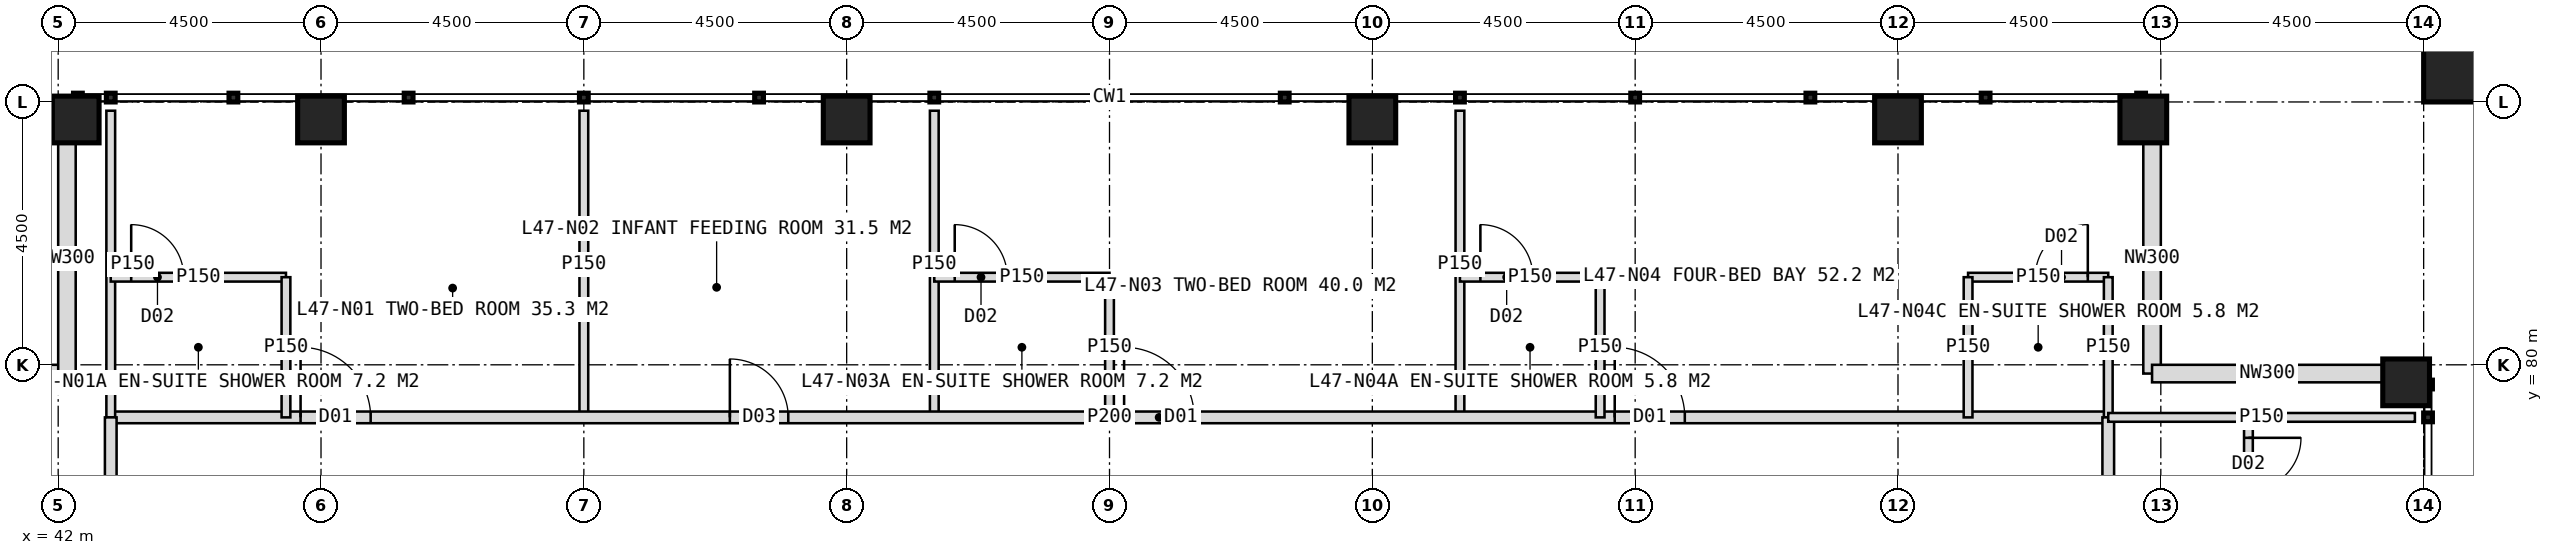
"""IFC4 building model, lengths in metres.
Left out: names, types, materials, properties, quantities, classifications, styles, units other than length and angle.
Written with IfcOpenShell. Run it as: python <this file> out.ifc"""

import sys

from ifc_helpers import new_model, si_unit, direction, frame, frame_2d, origin, origin_2d, place, context, subcontext, project, spatial, rectangle, hollow_rectangle, extrude, element, fill, save


model = new_model("IFC4")
c1 = context("Model", 3, precision=1e-05, world=origin(), true_north=direction((0.0, 1.0)))
c2 = subcontext(c1, "Body", "Model", "MODEL_VIEW")
j1 = project(units=[si_unit("LENGTHUNIT", "METRE"), si_unit("PLANEANGLEUNIT", "RADIAN")], contexts=[c1])
p1 = place(None, origin())
s1 = spatial("IfcSite", under=j1, at=p1, CompositionType="ELEMENT")
p2 = place(p1, origin())
s2 = spatial("IfcBuilding", under=s1, at=p2, CompositionType="ELEMENT")
p3 = place(p2, frame((0.0, 0.0, 197.0)))
s3 = spatial("IfcBuildingStorey", under=s2, at=p3, CompositionType="ELEMENT", Elevation=197.0)
for number, where, z_axis, x_axis in (
    (1, (42.3, 84.2, 0.0), (0.0, 0.0, 1.0), (1.0, 0.0, 0.0)),
    (2, (46.5, 84.2, 0.0), (0.0, 0.0, 1.0), (1.0, 0.0, 0.0)),
    (3, (55.5, 84.2, 0.0), (0.0, 0.0, 1.0), (1.0, 0.0, 0.0)),
    (4, (64.5, 84.2, 0.0), (0.0, 0.0, 1.0), (1.0, 0.0, 0.0)),
    (5, (73.5, 84.2, 0.0), (0.0, 0.0, 1.0), (1.0, 0.0, 0.0)),
    (6, (77.7, 84.2, 0.0), (0.0, 0.0, 1.0), (1.0, 0.0, 0.0)),
    (7, (82.2, 79.7, 0.0), (0.0, 0.0, 1.0), (1.0, 0.0, 0.0)),
):
    element("IfcColumn", number, at=place(p3, frame(where, z_axis=z_axis, x_axis=x_axis)), inside=s3, PredefinedType="COLUMN", context=c2, shape_type="SweptSolid", body=[
        extrude(hollow_rectangle(XDim=0.8, YDim=0.8, WallThickness=0.08, at=origin_2d()), origin(), (0.0, 0.0, 1.0), 4.0),
    ])
p4 = place(p3, frame((83.1, 85.1, 0.0), z_axis=(0.0, 0.0, 1.0), x_axis=(1.0, 0.0, 0.0)))
e8 = element("IfcColumn", 8, at=p4, inside=s3, PredefinedType="COLUMN", context=c2, shape_type="SweptSolid", body=[
    extrude(hollow_rectangle(XDim=1.2, YDim=1.2, WallThickness=0.07, at=origin_2d()), origin(), (0.0, 0.0, 1.0), 4.0),
])
for number, where, z_axis, x_axis in (
    (9, (77.85, 83.8, 0.0), (0.0, 0.0, 1.0), (0.0, -1.0, 0.0)),
    (10, (77.85, 79.85, 0.0), (0.0, 0.0, 1.0), (1.0, 0.0, 0.0)),
    (11, (38.2, 79.85, 0.0), (0.0, 0.0, 1.0), (1.0, 0.0, 0.0)),
    (12, (42.15, 79.85, 0.0), (0.0, 0.0, 1.0), (0.0, 1.0, 0.0)),
):
    element("IfcWall", number, at=place(p3, frame(where, z_axis=z_axis, x_axis=x_axis)), inside=s3, PredefinedType="ELEMENTEDWALL", context=c2, shape_type="SweptSolid", body=[
        extrude(rectangle(XDim=3.95, YDim=0.3, at=frame_2d((1.975, 0.0))), origin(), (0.0, 0.0, 1.0), 2.85),
    ])
for number, where, z_axis, x_axis in (
    (13, (51.0, 79.1, 0.0), (0.0, 0.0, 1.0), (0.0, 1.0, 0.0)),
    (14, (57.0, 79.1, 0.0), (0.0, 0.0, 1.0), (0.0, 1.0, 0.0)),
    (15, (66.0, 79.1, 0.0), (0.0, 0.0, 1.0), (0.0, 1.0, 0.0)),
):
    element("IfcWall", number, at=place(p3, frame(where, z_axis=z_axis, x_axis=x_axis)), inside=s3, PredefinedType="PARTITIONING", context=c2, shape_type="SweptSolid", body=[
        extrude(rectangle(XDim=5.25, YDim=0.15, at=frame_2d((2.625, 0.0))), origin(), (0.0, 0.0, 1.0), 3.75),
    ])
p5 = place(p3, frame((42.9, 79.1, 0.0), z_axis=(0.0, 0.0, 1.0), x_axis=(1.0, 0.0, 0.0)))
e16 = element("IfcWall", 16, at=p5, inside=s3, PredefinedType="PARTITIONING", context=c2, shape_type="SweptSolid", body=[
    extrude(rectangle(XDim=34.2, YDim=0.2, at=frame_2d((17.1, 0.0))), origin(), (0.0, 0.0, 1.0), 3.75),
])
p6 = place(p5, frame((3.25, 0.0, 0.0)))
e17 = element("IfcOpeningElement", 17, at=p6, cuts=e16, PredefinedType="OPENING", context=c2, shape_type="SweptSolid", body=[
    extrude(rectangle(XDim=1.2, YDim=2.2, at=frame_2d((0.6, 1.1))), frame((0.0, 0.11, 0.0), z_axis=(0.0, -1.0, 0.0), x_axis=(1.0, 0.0, 0.0)), (0.0, 0.0, 1.0), 0.22),
])
p7 = place(p5, frame((10.6, 0.0, 0.0)))
e18 = element("IfcOpeningElement", 18, at=p7, cuts=e16, PredefinedType="OPENING", context=c2, shape_type="SweptSolid", body=[
    extrude(rectangle(XDim=1.0, YDim=2.1, at=frame_2d((0.5, 1.05))), frame((0.0, 0.11, 0.0), z_axis=(0.0, -1.0, 0.0), x_axis=(1.0, 0.0, 0.0)), (0.0, 0.0, 1.0), 0.22),
])
p8 = place(p5, frame((17.35, 0.0, 0.0)))
e19 = element("IfcOpeningElement", 19, at=p8, cuts=e16, PredefinedType="OPENING", context=c2, shape_type="SweptSolid", body=[
    extrude(rectangle(XDim=1.2, YDim=2.2, at=frame_2d((0.6, 1.1))), frame((0.0, 0.11, 0.0), z_axis=(0.0, -1.0, 0.0), x_axis=(1.0, 0.0, 0.0)), (0.0, 0.0, 1.0), 0.22),
])
p9 = place(p5, frame((25.75, 0.0, 0.0)))
e20 = element("IfcOpeningElement", 20, at=p9, cuts=e16, PredefinedType="OPENING", context=c2, shape_type="SweptSolid", body=[
    extrude(rectangle(XDim=1.2, YDim=2.2, at=frame_2d((0.6, 1.1))), frame((0.0, 0.11, 0.0), z_axis=(0.0, -1.0, 0.0), x_axis=(1.0, 0.0, 0.0)), (0.0, 0.0, 1.0), 0.22),
])
p10 = place(p3, frame((42.9, 79.1, 0.0), z_axis=(0.0, 0.0, 1.0), x_axis=(0.0, 1.0, 0.0)))
e21 = element("IfcWall", 21, at=p10, inside=s3, PredefinedType="PARTITIONING", context=c2, shape_type="SweptSolid", body=[
    extrude(rectangle(XDim=5.25, YDim=0.15, at=frame_2d((2.625, 0.0))), origin(), (0.0, 0.0, 1.0), 3.75),
])
p11 = place(p3, frame((42.9, 81.5, 0.0), z_axis=(0.0, 0.0, 1.0), x_axis=(1.0, 0.0, 0.0)))
e22 = element("IfcWall", 22, at=p11, inside=s3, PredefinedType="PARTITIONING", context=c2, shape_type="SweptSolid", body=[
    extrude(rectangle(XDim=3.0, YDim=0.15, at=frame_2d((1.5, 0.0))), origin(), (0.0, 0.0, 1.0), 3.75),
])
p12 = place(p11, frame((0.35, 0.0, 0.0)))
e23 = element("IfcOpeningElement", 23, at=p12, cuts=e22, PredefinedType="OPENING", context=c2, shape_type="SweptSolid", body=[
    extrude(rectangle(XDim=0.9, YDim=2.1, at=frame_2d((0.45, 1.05))), frame((0.0, 0.085, 0.0), z_axis=(0.0, -1.0, 0.0), x_axis=(1.0, 0.0, 0.0)), (0.0, 0.0, 1.0), 0.17),
])
p13 = place(p3, frame((45.9, 79.1, 0.0), z_axis=(0.0, 0.0, 1.0), x_axis=(0.0, 1.0, 0.0)))
e24 = element("IfcWall", 24, at=p13, inside=s3, PredefinedType="PARTITIONING", context=c2, shape_type="SweptSolid", body=[
    extrude(rectangle(XDim=2.4, YDim=0.15, at=frame_2d((1.2, 0.0))), origin(), (0.0, 0.0, 1.0), 3.75),
])
p14 = place(p3, frame((57.0, 81.5, 0.0), z_axis=(0.0, 0.0, 1.0), x_axis=(1.0, 0.0, 0.0)))
e25 = element("IfcWall", 25, at=p14, inside=s3, PredefinedType="PARTITIONING", context=c2, shape_type="SweptSolid", body=[
    extrude(rectangle(XDim=3.0, YDim=0.15, at=frame_2d((1.5, 0.0))), origin(), (0.0, 0.0, 1.0), 3.75),
])
p15 = place(p14, frame((0.35, 0.0, 0.0)))
e26 = element("IfcOpeningElement", 26, at=p15, cuts=e25, PredefinedType="OPENING", context=c2, shape_type="SweptSolid", body=[
    extrude(rectangle(XDim=0.9, YDim=2.1, at=frame_2d((0.45, 1.05))), frame((0.0, 0.085, 0.0), z_axis=(0.0, -1.0, 0.0), x_axis=(1.0, 0.0, 0.0)), (0.0, 0.0, 1.0), 0.17),
])
p16 = place(p3, frame((60.0, 79.1, 0.0), z_axis=(0.0, 0.0, 1.0), x_axis=(0.0, 1.0, 0.0)))
e27 = element("IfcWall", 27, at=p16, inside=s3, PredefinedType="PARTITIONING", context=c2, shape_type="SweptSolid", body=[
    extrude(rectangle(XDim=2.4, YDim=0.15, at=frame_2d((1.2, 0.0))), origin(), (0.0, 0.0, 1.0), 2.95),
])
p17 = place(p3, frame((66.0, 81.5, 0.0), z_axis=(0.0, 0.0, 1.0), x_axis=(1.0, 0.0, 0.0)))
e28 = element("IfcWall", 28, at=p17, inside=s3, PredefinedType="PARTITIONING", context=c2, shape_type="SweptSolid", body=[
    extrude(rectangle(XDim=2.4, YDim=0.15, at=frame_2d((1.2, 0.0))), origin(), (0.0, 0.0, 1.0), 3.75),
])
p18 = place(p17, frame((0.35, 0.0, 0.0)))
e29 = element("IfcOpeningElement", 29, at=p18, cuts=e28, PredefinedType="OPENING", context=c2, shape_type="SweptSolid", body=[
    extrude(rectangle(XDim=0.9, YDim=2.1, at=frame_2d((0.45, 1.05))), frame((0.0, 0.085, 0.0), z_axis=(0.0, -1.0, 0.0), x_axis=(1.0, 0.0, 0.0)), (0.0, 0.0, 1.0), 0.17),
])
p19 = place(p3, frame((68.4, 79.1, 0.0), z_axis=(0.0, 0.0, 1.0), x_axis=(0.0, 1.0, 0.0)))
e30 = element("IfcWall", 30, at=p19, inside=s3, PredefinedType="PARTITIONING", context=c2, shape_type="SweptSolid", body=[
    extrude(rectangle(XDim=2.4, YDim=0.15, at=frame_2d((1.2, 0.0))), origin(), (0.0, 0.0, 1.0), 3.75),
])
p20 = place(p3, frame((74.7, 81.5, 0.0), z_axis=(0.0, 0.0, 1.0), x_axis=(1.0, 0.0, 0.0)))
e31 = element("IfcWall", 31, at=p20, inside=s3, PredefinedType="PARTITIONING", context=c2, shape_type="SweptSolid", body=[
    extrude(rectangle(XDim=2.4, YDim=0.15, at=frame_2d((1.2, 0.0))), origin(), (0.0, 0.0, 1.0), 3.75),
])
p21 = place(p20, frame((1.15, 0.0, 0.0)))
e32 = element("IfcOpeningElement", 32, at=p21, cuts=e31, PredefinedType="OPENING", context=c2, shape_type="SweptSolid", body=[
    extrude(rectangle(XDim=0.9, YDim=2.1, at=frame_2d((0.45, 1.05))), frame((0.0, 0.085, 0.0), z_axis=(0.0, -1.0, 0.0), x_axis=(1.0, 0.0, 0.0)), (0.0, 0.0, 1.0), 0.17),
])
for number, where, z_axis, x_axis in (
    (33, (74.7, 79.1, 0.0), (0.0, 0.0, 1.0), (0.0, 1.0, 0.0)),
    (34, (77.1, 79.1, 0.0), (0.0, 0.0, 1.0), (0.0, 1.0, 0.0)),
):
    element("IfcWall", number, at=place(p3, frame(where, z_axis=z_axis, x_axis=x_axis)), inside=s3, PredefinedType="PARTITIONING", context=c2, shape_type="SweptSolid", body=[
        extrude(rectangle(XDim=2.4, YDim=0.15, at=frame_2d((1.2, 0.0))), origin(), (0.0, 0.0, 1.0), 3.75),
    ])
p22 = place(p3, frame((42.9, 44.9, 0.0), z_axis=(0.0, 0.0, 1.0), x_axis=(0.0, 1.0, 0.0)))
e35 = element("IfcWall", 35, at=p22, inside=s3, PredefinedType="PARTITIONING", context=c2, shape_type="SweptSolid", body=[
    extrude(rectangle(XDim=34.2, YDim=0.2, at=frame_2d((17.1, 0.0))), origin(), (0.0, 0.0, 1.0), 3.75),
])
p23 = place(p22, frame((3.25, 0.0, 0.0)))
e36 = element("IfcOpeningElement", 36, at=p23, cuts=e35, PredefinedType="OPENING", context=c2, shape_type="SweptSolid", body=[
    extrude(rectangle(XDim=1.2, YDim=2.2, at=frame_2d((0.6, 1.1))), frame((0.0, 0.11, 0.0), z_axis=(0.0, -1.0, 0.0), x_axis=(1.0, 0.0, 0.0)), (0.0, 0.0, 1.0), 0.22),
])
p24 = place(p22, frame((11.35, 0.0, 0.0)))
e37 = element("IfcOpeningElement", 37, at=p24, cuts=e35, PredefinedType="OPENING", context=c2, shape_type="SweptSolid", body=[
    extrude(rectangle(XDim=1.2, YDim=2.2, at=frame_2d((0.6, 1.1))), frame((0.0, 0.11, 0.0), z_axis=(0.0, -1.0, 0.0), x_axis=(1.0, 0.0, 0.0)), (0.0, 0.0, 1.0), 0.22),
])
p25 = place(p22, frame((20.35, 0.0, 0.0)))
e38 = element("IfcOpeningElement", 38, at=p25, cuts=e35, PredefinedType="OPENING", context=c2, shape_type="SweptSolid", body=[
    extrude(rectangle(XDim=1.2, YDim=2.2, at=frame_2d((0.6, 1.1))), frame((0.0, 0.11, 0.0), z_axis=(0.0, -1.0, 0.0), x_axis=(1.0, 0.0, 0.0)), (0.0, 0.0, 1.0), 0.22),
])
p26 = place(p22, frame((29.35, 0.0, 0.0)))
e39 = element("IfcOpeningElement", 39, at=p26, cuts=e35, PredefinedType="OPENING", context=c2, shape_type="SweptSolid", body=[
    extrude(rectangle(XDim=1.2, YDim=2.2, at=frame_2d((0.6, 1.1))), frame((0.0, 0.11, 0.0), z_axis=(0.0, -1.0, 0.0), x_axis=(1.0, 0.0, 0.0)), (0.0, 0.0, 1.0), 0.22),
])
p27 = place(p3, frame((77.1, 79.1, 0.0), z_axis=(0.0, 0.0, 1.0), x_axis=(0.0, -1.0, 0.0)))
e40 = element("IfcWall", 40, at=p27, inside=s3, PredefinedType="PARTITIONING", context=c2, shape_type="SweptSolid", body=[
    extrude(rectangle(XDim=34.2, YDim=0.2, at=frame_2d((17.1, 0.0))), origin(), (0.0, 0.0, 1.0), 3.75),
])
p28 = place(p27, frame((3.25, 0.0, 0.0)))
e41 = element("IfcOpeningElement", 41, at=p28, cuts=e40, PredefinedType="OPENING", context=c2, shape_type="SweptSolid", body=[
    extrude(rectangle(XDim=1.2, YDim=2.2, at=frame_2d((0.6, 1.1))), frame((0.0, 0.11, 0.0), z_axis=(0.0, -1.0, 0.0), x_axis=(1.0, 0.0, 0.0)), (0.0, 0.0, 1.0), 0.22),
])
p29 = place(p27, frame((11.35, 0.0, 0.0)))
e42 = element("IfcOpeningElement", 42, at=p29, cuts=e40, PredefinedType="OPENING", context=c2, shape_type="SweptSolid", body=[
    extrude(rectangle(XDim=1.2, YDim=2.2, at=frame_2d((0.6, 1.1))), frame((0.0, 0.11, 0.0), z_axis=(0.0, -1.0, 0.0), x_axis=(1.0, 0.0, 0.0)), (0.0, 0.0, 1.0), 0.22),
])
p30 = place(p27, frame((19.75, 0.0, 0.0)))
e43 = element("IfcOpeningElement", 43, at=p30, cuts=e40, PredefinedType="OPENING", context=c2, shape_type="SweptSolid", body=[
    extrude(rectangle(XDim=1.2, YDim=2.2, at=frame_2d((0.6, 1.1))), frame((0.0, 0.11, 0.0), z_axis=(0.0, -1.0, 0.0), x_axis=(1.0, 0.0, 0.0)), (0.0, 0.0, 1.0), 0.22),
])
p31 = place(p27, frame((25.75, 0.0, 0.0)))
e44 = element("IfcOpeningElement", 44, at=p31, cuts=e40, PredefinedType="OPENING", context=c2, shape_type="SweptSolid", body=[
    extrude(rectangle(XDim=1.2, YDim=2.2, at=frame_2d((0.6, 1.1))), frame((0.0, 0.11, 0.0), z_axis=(0.0, -1.0, 0.0), x_axis=(1.0, 0.0, 0.0)), (0.0, 0.0, 1.0), 0.22),
])
p32 = place(p3, frame((77.1, 79.1, 0.0), z_axis=(0.0, 0.0, 1.0), x_axis=(1.0, 0.0, 0.0)))
e45 = element("IfcWall", 45, at=p32, inside=s3, PredefinedType="PARTITIONING", context=c2, shape_type="SweptSolid", body=[
    extrude(rectangle(XDim=5.25, YDim=0.15, at=frame_2d((2.625, 0.0))), origin(), (0.0, 0.0, 1.0), 3.75),
])
p33 = place(p3, frame((79.5, 79.1, 0.0), z_axis=(0.0, 0.0, 1.0), x_axis=(0.0, -1.0, 0.0)))
e46 = element("IfcWall", 46, at=p33, inside=s3, PredefinedType="PARTITIONING", context=c2, shape_type="SweptSolid", body=[
    extrude(rectangle(XDim=3.0, YDim=0.15, at=frame_2d((1.5, 0.0))), origin(), (0.0, 0.0, 1.0), 3.75),
])
p34 = place(p33, frame((0.35, 0.0, 0.0)))
e47 = element("IfcOpeningElement", 47, at=p34, cuts=e46, PredefinedType="OPENING", context=c2, shape_type="SweptSolid", body=[
    extrude(rectangle(XDim=0.9, YDim=2.1, at=frame_2d((0.45, 1.05))), frame((0.0, 0.085, 0.0), z_axis=(0.0, -1.0, 0.0), x_axis=(1.0, 0.0, 0.0)), (0.0, 0.0, 1.0), 0.17),
])
p35 = place(p6, origin())
e48 = element("IfcDoor", 48, at=p35, inside=s3, OperationType="SINGLE_SWING_LEFT", PredefinedType="DOOR", context=c2, shape_type="SweptSolid", body=[
    extrude(rectangle(XDim=1.2, YDim=2.2, at=frame_2d((0.6, 1.1))), frame((0.0, 0.025, 0.0), z_axis=(0.0, -1.0, 0.0), x_axis=(1.0, 0.0, 0.0)), (0.0, 0.0, 1.0), 0.05),
])
fill(e17, e48)
p36 = place(p12, origin())
e49 = element("IfcDoor", 49, at=p36, inside=s3, OperationType="SINGLE_SWING_LEFT", PredefinedType="DOOR", context=c2, shape_type="SweptSolid", body=[
    extrude(rectangle(XDim=0.9, YDim=2.1, at=frame_2d((0.45, 1.05))), frame((0.0, 0.025, 0.0), z_axis=(0.0, -1.0, 0.0), x_axis=(1.0, 0.0, 0.0)), (0.0, 0.0, 1.0), 0.05),
])
fill(e23, e49)
p37 = place(p7, origin())
e50 = element("IfcDoor", 50, at=p37, inside=s3, OperationType="SINGLE_SWING_LEFT", PredefinedType="DOOR", context=c2, shape_type="SweptSolid", body=[
    extrude(rectangle(XDim=1.0, YDim=2.1, at=frame_2d((0.5, 1.05))), frame((0.0, 0.025, 0.0), z_axis=(0.0, -1.0, 0.0), x_axis=(1.0, 0.0, 0.0)), (0.0, 0.0, 1.0), 0.05),
])
fill(e18, e50)
p38 = place(p8, origin())
e51 = element("IfcDoor", 51, at=p38, inside=s3, OperationType="SINGLE_SWING_LEFT", PredefinedType="DOOR", context=c2, shape_type="SweptSolid", body=[
    extrude(rectangle(XDim=1.2, YDim=2.2, at=frame_2d((0.6, 1.1))), frame((0.0, 0.025, 0.0), z_axis=(0.0, -1.0, 0.0), x_axis=(1.0, 0.0, 0.0)), (0.0, 0.0, 1.0), 0.05),
])
fill(e19, e51)
p39 = place(p15, origin())
e52 = element("IfcDoor", 52, at=p39, inside=s3, OperationType="SINGLE_SWING_LEFT", PredefinedType="DOOR", context=c2, shape_type="SweptSolid", body=[
    extrude(rectangle(XDim=0.9, YDim=2.1, at=frame_2d((0.45, 1.05))), frame((0.0, 0.025, 0.0), z_axis=(0.0, -1.0, 0.0), x_axis=(1.0, 0.0, 0.0)), (0.0, 0.0, 1.0), 0.05),
])
fill(e26, e52)
p40 = place(p9, origin())
e53 = element("IfcDoor", 53, at=p40, inside=s3, OperationType="SINGLE_SWING_LEFT", PredefinedType="DOOR", context=c2, shape_type="SweptSolid", body=[
    extrude(rectangle(XDim=1.2, YDim=2.2, at=frame_2d((0.6, 1.1))), frame((0.0, 0.025, 0.0), z_axis=(0.0, -1.0, 0.0), x_axis=(1.0, 0.0, 0.0)), (0.0, 0.0, 1.0), 0.05),
])
fill(e20, e53)
p41 = place(p18, origin())
e54 = element("IfcDoor", 54, at=p41, inside=s3, OperationType="SINGLE_SWING_LEFT", PredefinedType="DOOR", context=c2, shape_type="SweptSolid", body=[
    extrude(rectangle(XDim=0.9, YDim=2.1, at=frame_2d((0.45, 1.05))), frame((0.0, 0.025, 0.0), z_axis=(0.0, -1.0, 0.0), x_axis=(1.0, 0.0, 0.0)), (0.0, 0.0, 1.0), 0.05),
])
fill(e29, e54)
p42 = place(p21, origin())
e55 = element("IfcDoor", 55, at=p42, inside=s3, OperationType="SINGLE_SWING_RIGHT", PredefinedType="DOOR", context=c2, shape_type="SweptSolid", body=[
    extrude(rectangle(XDim=0.9, YDim=2.1, at=frame_2d((0.45, 1.05))), frame((0.0, 0.025, 0.0), z_axis=(0.0, -1.0, 0.0), x_axis=(1.0, 0.0, 0.0)), (0.0, 0.0, 1.0), 0.05),
])
fill(e32, e55)
p43 = place(p34, origin())
e56 = element("IfcDoor", 56, at=p43, inside=s3, OperationType="SINGLE_SWING_LEFT", PredefinedType="DOOR", context=c2, shape_type="SweptSolid", body=[
    extrude(rectangle(XDim=0.9, YDim=2.1, at=frame_2d((0.45, 1.05))), frame((0.0, 0.025, 0.0), z_axis=(0.0, -1.0, 0.0), x_axis=(1.0, 0.0, 0.0)), (0.0, 0.0, 1.0), 0.05),
])
fill(e47, e56)
save(model, sys.argv[1])
